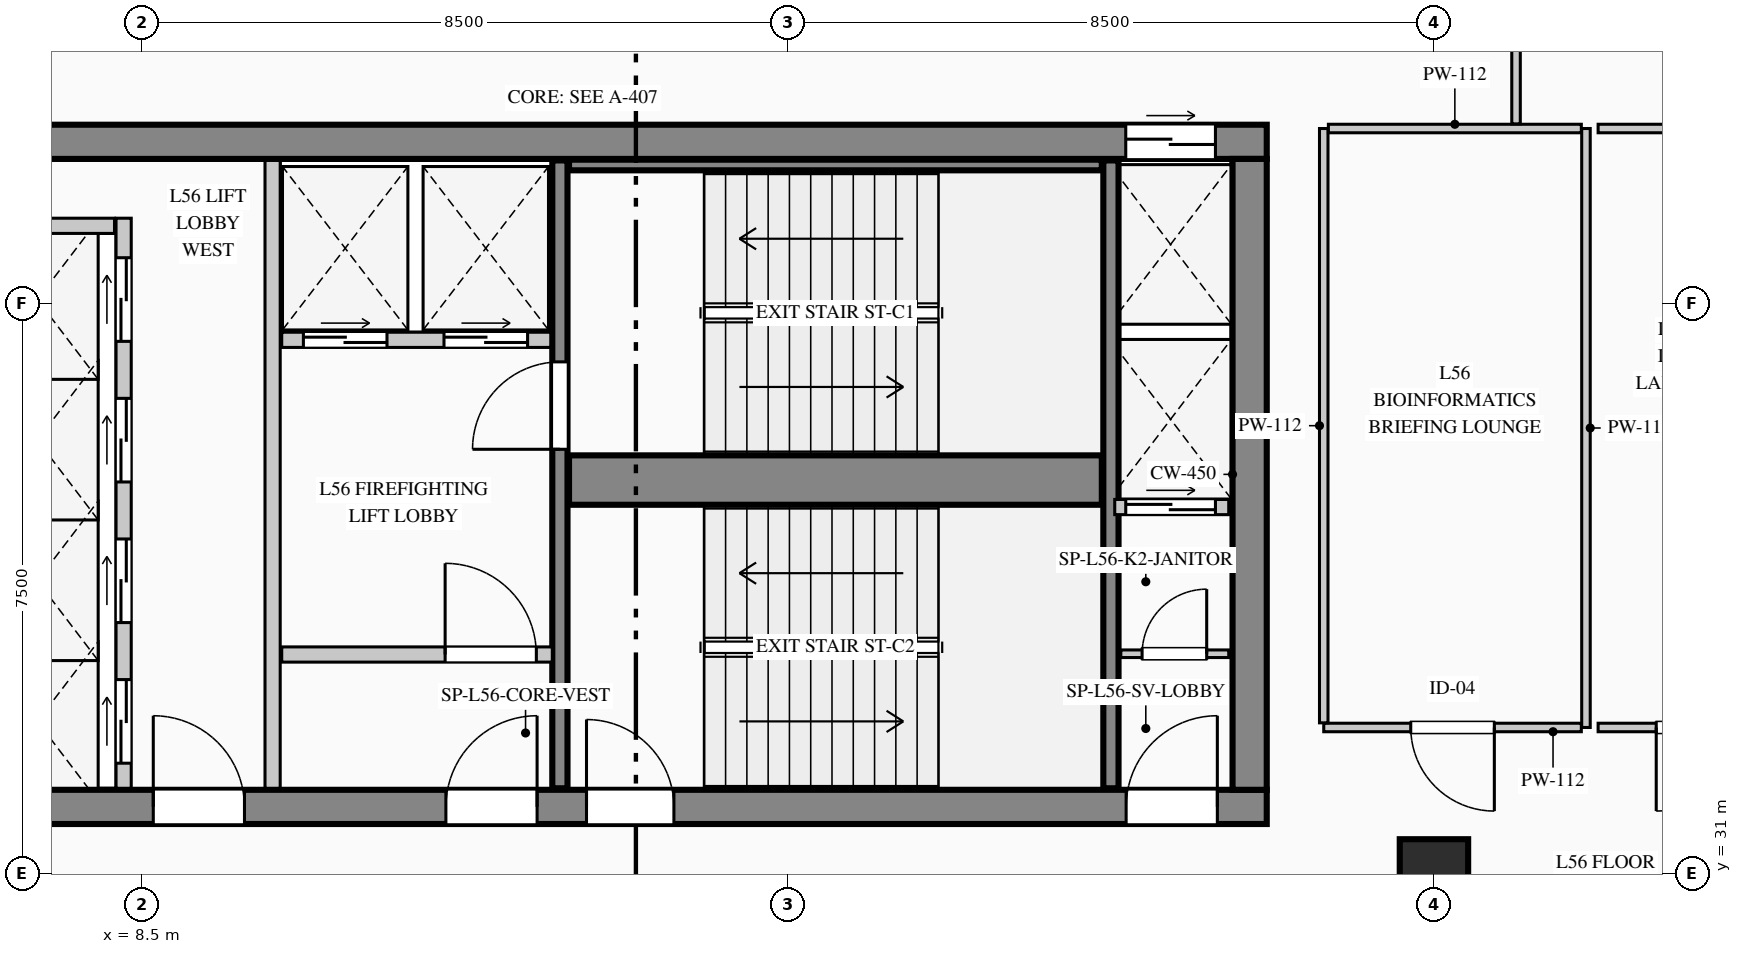
"""IFC4 building model, lengths in metres.
Left out: names, types, materials, properties, quantities, classifications, styles, units other than length and angle.
Written with IfcOpenShell. Run it as: python <this file> out.ifc"""

import sys

from ifc_helpers import new_model, si_unit, direction, frame, frame_2d, origin, origin_2d, place, context, subcontext, project, spatial, rectangle, extrude, element, fill, save


model = new_model("IFC4")
c1 = context("Model", 3, precision=1e-05, world=origin(), true_north=direction((0.0, 1.0)))
c2 = subcontext(c1, "Body", "Model", "MODEL_VIEW")
j1 = project(units=[si_unit("LENGTHUNIT", "METRE"), si_unit("PLANEANGLEUNIT", "RADIAN")], contexts=[c1])
p1 = place(None, origin())
s1 = spatial("IfcSite", under=j1, at=p1, CompositionType="ELEMENT")
p2 = place(p1, origin())
s2 = spatial("IfcBuilding", under=s1, at=p2, CompositionType="ELEMENT")
p3 = place(p2, frame((0.0, 0.0, 235.1)))
s3 = spatial("IfcBuildingStorey", under=s2, at=p3, CompositionType="ELEMENT", Elevation=235.1)
p4 = place(p3, frame((5.55, 40.625, 0.0), z_axis=(0.0, 0.0, 1.0), x_axis=(1.0, 0.0, 0.0)))
e1 = element("IfcWall", 1, at=p4, inside=s3, PredefinedType="SHEAR", context=c2, shape_type="SweptSolid", body=[
    extrude(rectangle(XDim=17.75, YDim=0.45, at=frame_2d((8.875, 0.0))), origin(), (0.0, 0.0, 1.0), 3.95),
])
p5 = place(p4, frame((15.895, 0.0, 0.0)))
e2 = element("IfcOpeningElement", 2, at=p5, cuts=e1, PredefinedType="OPENING", context=c2, shape_type="SweptSolid", body=[
    extrude(rectangle(XDim=1.18, YDim=2.25, at=frame_2d((0.59, 1.125))), frame((0.0, 0.235, 0.0), z_axis=(0.0, -1.0, 0.0), x_axis=(1.0, 0.0, 0.0)), (0.0, 0.0, 1.0), 0.47),
])
p6 = place(p3, frame((5.55, 31.875, 0.0), z_axis=(0.0, 0.0, 1.0), x_axis=(1.0, 0.0, 0.0)))
e3 = element("IfcWall", 3, at=p6, inside=s3, PredefinedType="SHEAR", context=c2, shape_type="SweptSolid", body=[
    extrude(rectangle(XDim=17.75, YDim=0.45, at=frame_2d((8.875, 0.0))), origin(), (0.0, 0.0, 1.0), 3.95),
])
p7 = place(p6, frame((3.1, 0.0, 0.0)))
e4 = element("IfcOpeningElement", 4, at=p7, cuts=e3, PredefinedType="OPENING", context=c2, shape_type="SweptSolid", body=[
    extrude(rectangle(XDim=1.2, YDim=2.2, at=frame_2d((0.6, 1.1))), frame((0.0, 0.235, 0.0), z_axis=(0.0, -1.0, 0.0), x_axis=(1.0, 0.0, 0.0)), (0.0, 0.0, 1.0), 0.47),
])
p8 = place(p6, frame((6.95, 0.0, 0.0)))
e5 = element("IfcOpeningElement", 5, at=p8, cuts=e3, PredefinedType="OPENING", context=c2, shape_type="SweptSolid", body=[
    extrude(rectangle(XDim=1.2, YDim=2.2, at=frame_2d((0.6, 1.1))), frame((0.0, 0.235, 0.0), z_axis=(0.0, -1.0, 0.0), x_axis=(1.0, 0.0, 0.0)), (0.0, 0.0, 1.0), 0.47),
])
p9 = place(p6, frame((8.8, 0.0, 0.0)))
e6 = element("IfcOpeningElement", 6, at=p9, cuts=e3, PredefinedType="OPENING", context=c2, shape_type="SweptSolid", body=[
    extrude(rectangle(XDim=1.15, YDim=2.2, at=frame_2d((0.575, 1.1))), frame((0.0, 0.235, 0.0), z_axis=(0.0, -1.0, 0.0), x_axis=(1.0, 0.0, 0.0)), (0.0, 0.0, 1.0), 0.47),
])
p10 = place(p6, frame((15.9, 0.0, 0.0)))
e7 = element("IfcOpeningElement", 7, at=p10, cuts=e3, PredefinedType="OPENING", context=c2, shape_type="SweptSolid", body=[
    extrude(rectangle(XDim=1.2, YDim=2.2, at=frame_2d((0.6, 1.1))), frame((0.0, 0.235, 0.0), z_axis=(0.0, -1.0, 0.0), x_axis=(1.0, 0.0, 0.0)), (0.0, 0.0, 1.0), 0.47),
])
p11 = place(p3, frame((23.075, 32.1, 0.0), z_axis=(0.0, 0.0, 1.0), x_axis=(0.0, 1.0, 0.0)))
e8 = element("IfcWall", 8, at=p11, inside=s3, PredefinedType="SHEAR", context=c2, shape_type="SweptSolid", body=[
    extrude(rectangle(XDim=8.3, YDim=0.45, at=frame_2d((4.15, 0.0))), origin(), (0.0, 0.0, 1.0), 3.95),
])
p12 = place(p3, frame((14.0, 32.12, 0.0), z_axis=(0.0, 0.0, 1.0), x_axis=(0.0, 1.0, 0.0)))
e9 = element("IfcWall", 9, at=p12, inside=s3, PredefinedType="SHEAR", context=c2, shape_type="SweptSolid", body=[
    extrude(rectangle(XDim=8.26, YDim=0.2, at=frame_2d((4.13, 0.0))), origin(), (0.0, 0.0, 1.0), 3.95),
])
p13 = place(p12, frame((4.46, 0.0, 0.0)))
e10 = element("IfcOpeningElement", 10, at=p13, cuts=e9, PredefinedType="OPENING", context=c2, shape_type="SweptSolid", body=[
    extrude(rectangle(XDim=1.15, YDim=2.2, at=frame_2d((0.575, 1.1))), frame((0.0, 0.11, 0.0), z_axis=(0.0, -1.0, 0.0), x_axis=(1.0, 0.0, 0.0)), (0.0, 0.0, 1.0), 0.22),
])
p14 = place(p3, frame((14.12, 36.175, 0.0), z_axis=(0.0, 0.0, 1.0), x_axis=(1.0, 0.0, 0.0)))
e11 = element("IfcWall", 11, at=p14, inside=s3, PredefinedType="SHEAR", context=c2, shape_type="SweptSolid", body=[
    extrude(rectangle(XDim=7.01, YDim=0.65, at=frame_2d((3.505, 0.0))), origin(), (0.0, 0.0, 1.0), 3.95),
])
p15 = place(p3, frame((21.25, 32.12, 0.0), z_axis=(0.0, 0.0, 1.0), x_axis=(0.0, 1.0, 0.0)))
e12 = element("IfcWall", 12, at=p15, inside=s3, PredefinedType="SHEAR", context=c2, shape_type="SweptSolid", body=[
    extrude(rectangle(XDim=8.26, YDim=0.2, at=frame_2d((4.13, 0.0))), origin(), (0.0, 0.0, 1.0), 3.95),
])
p16 = place(p3, frame((14.12, 40.32, 0.0), z_axis=(0.0, 0.0, 1.0), x_axis=(1.0, 0.0, 0.0)))
e13 = element("IfcWall", 13, at=p16, inside=s3, PredefinedType="SHEAR", context=c2, shape_type="SweptSolid", body=[
    extrude(rectangle(XDim=7.01, YDim=0.14, at=frame_2d((3.505, 0.0))), origin(), (0.0, 0.0, 1.0), 3.95),
])
p17 = place(p3, frame((25.5, 31.0, 0.0), z_axis=(0.0, 0.0, 1.0), x_axis=(1.0, 0.0, 0.0)))
e14 = element("IfcColumn", 14, at=p17, inside=s3, PredefinedType="COLUMN", context=c2, shape_type="SweptSolid", body=[
    extrude(rectangle(XDim=0.9, YDim=0.9, at=origin_2d()), origin(), (0.0, 0.0, 1.0), 3.95),
])
p18 = place(p3, frame((8.26, 32.12, 0.0), z_axis=(0.0, 0.0, 1.0), x_axis=(0.0, 1.0, 0.0)))
e15 = element("IfcWall", 15, at=p18, inside=s3, PredefinedType="PARTITIONING", context=c2, shape_type="SweptSolid", body=[
    extrude(rectangle(XDim=7.5, YDim=0.2, at=frame_2d((3.75, 0.0))), origin(), (0.0, 0.0, 1.0), 3.7),
])
p19 = place(p18, frame((0.33, 0.0, 0.0)))
e16 = element("IfcOpeningElement", 16, at=p19, cuts=e15, PredefinedType="OPENING", context=c2, shape_type="SweptSolid", body=[
    extrude(rectangle(XDim=1.1, YDim=2.2, at=frame_2d((0.55, 1.1))), frame((0.0, 0.11, 0.0), z_axis=(0.0, -1.0, 0.0), x_axis=(1.0, 0.0, 0.0)), (0.0, 0.0, 1.0), 0.22),
])
p20 = place(p18, frame((2.18, 0.0, 0.0)))
e17 = element("IfcOpeningElement", 17, at=p20, cuts=e15, PredefinedType="OPENING", context=c2, shape_type="SweptSolid", body=[
    extrude(rectangle(XDim=1.1, YDim=2.2, at=frame_2d((0.55, 1.1))), frame((0.0, 0.11, 0.0), z_axis=(0.0, -1.0, 0.0), x_axis=(1.0, 0.0, 0.0)), (0.0, 0.0, 1.0), 0.22),
])
p21 = place(p18, frame((4.03, 0.0, 0.0)))
e18 = element("IfcOpeningElement", 18, at=p21, cuts=e15, PredefinedType="OPENING", context=c2, shape_type="SweptSolid", body=[
    extrude(rectangle(XDim=1.1, YDim=2.2, at=frame_2d((0.55, 1.1))), frame((0.0, 0.11, 0.0), z_axis=(0.0, -1.0, 0.0), x_axis=(1.0, 0.0, 0.0)), (0.0, 0.0, 1.0), 0.22),
])
p22 = place(p18, frame((5.88, 0.0, 0.0)))
e19 = element("IfcOpeningElement", 19, at=p22, cuts=e15, PredefinedType="OPENING", context=c2, shape_type="SweptSolid", body=[
    extrude(rectangle(XDim=1.1, YDim=2.2, at=frame_2d((0.55, 1.1))), frame((0.0, 0.11, 0.0), z_axis=(0.0, -1.0, 0.0), x_axis=(1.0, 0.0, 0.0)), (0.0, 0.0, 1.0), 0.22),
])
p23 = place(p3, frame((6.02, 39.52, 0.0), z_axis=(0.0, 0.0, 1.0), x_axis=(1.0, 0.0, 0.0)))
e20 = element("IfcWall", 20, at=p23, inside=s3, PredefinedType="PARTITIONING", context=c2, shape_type="SweptSolid", body=[
    extrude(rectangle(XDim=2.12, YDim=0.2, at=frame_2d((1.06, 0.0))), origin(), (0.0, 0.0, 1.0), 3.7),
])
p24 = place(p3, frame((10.22, 32.12, 0.0), z_axis=(0.0, 0.0, 1.0), x_axis=(0.0, 1.0, 0.0)))
e21 = element("IfcWall", 21, at=p24, inside=s3, PredefinedType="PARTITIONING", context=c2, shape_type="SweptSolid", body=[
    extrude(rectangle(XDim=8.26, YDim=0.2, at=frame_2d((4.13, 0.0))), origin(), (0.0, 0.0, 1.0), 3.7),
])
p25 = place(p3, frame((10.34, 38.02, 0.0), z_axis=(0.0, 0.0, 1.0), x_axis=(1.0, 0.0, 0.0)))
e22 = element("IfcWall", 22, at=p25, inside=s3, PredefinedType="PARTITIONING", context=c2, shape_type="SweptSolid", body=[
    extrude(rectangle(XDim=3.54, YDim=0.2, at=frame_2d((1.77, 0.0))), origin(), (0.0, 0.0, 1.0), 3.7),
])
p26 = place(p25, frame((0.285, 0.0, 0.0)))
e23 = element("IfcOpeningElement", 23, at=p26, cuts=e22, PredefinedType="OPENING", context=c2, shape_type="SweptSolid", body=[
    extrude(rectangle(XDim=1.1, YDim=2.2, at=frame_2d((0.55, 1.1))), frame((0.0, 0.11, 0.0), z_axis=(0.0, -1.0, 0.0), x_axis=(1.0, 0.0, 0.0)), (0.0, 0.0, 1.0), 0.22),
])
p27 = place(p25, frame((2.135, 0.0, 0.0)))
e24 = element("IfcOpeningElement", 24, at=p27, cuts=e22, PredefinedType="OPENING", context=c2, shape_type="SweptSolid", body=[
    extrude(rectangle(XDim=1.1, YDim=2.2, at=frame_2d((0.55, 1.1))), frame((0.0, 0.11, 0.0), z_axis=(0.0, -1.0, 0.0), x_axis=(1.0, 0.0, 0.0)), (0.0, 0.0, 1.0), 0.22),
])
p28 = place(p3, frame((10.34, 33.88, 0.0), z_axis=(0.0, 0.0, 1.0), x_axis=(1.0, 0.0, 0.0)))
e25 = element("IfcWall", 25, at=p28, inside=s3, PredefinedType="PARTITIONING", context=c2, shape_type="SweptSolid", body=[
    extrude(rectangle(XDim=3.56, YDim=0.2, at=frame_2d((1.78, 0.0))), origin(), (0.0, 0.0, 1.0), 3.7),
])
p29 = place(p28, frame((2.15, 0.0, 0.0)))
e26 = element("IfcOpeningElement", 26, at=p29, cuts=e25, PredefinedType="OPENING", context=c2, shape_type="SweptSolid", body=[
    extrude(rectangle(XDim=1.2, YDim=2.2, at=frame_2d((0.6, 1.1))), frame((0.0, 0.11, 0.0), z_axis=(0.0, -1.0, 0.0), x_axis=(1.0, 0.0, 0.0)), (0.0, 0.0, 1.0), 0.22),
])
p30 = place(p3, frame((21.38, 33.89, 0.0), z_axis=(0.0, 0.0, 1.0), x_axis=(1.0, 0.0, 0.0)))
e27 = element("IfcWall", 27, at=p30, inside=s3, PredefinedType="PARTITIONING", context=c2, shape_type="SweptSolid", body=[
    extrude(rectangle(XDim=1.42, YDim=0.1, at=frame_2d((0.71, 0.0))), origin(), (0.0, 0.0, 1.0), 3.7),
])
p31 = place(p30, frame((0.28, 0.0, 0.0)))
e28 = element("IfcOpeningElement", 28, at=p31, cuts=e27, PredefinedType="OPENING", context=c2, shape_type="SweptSolid", body=[
    extrude(rectangle(XDim=0.85, YDim=2.1, at=frame_2d((0.425, 1.05))), frame((0.0, 0.06, 0.0), z_axis=(0.0, -1.0, 0.0), x_axis=(1.0, 0.0, 0.0)), (0.0, 0.0, 1.0), 0.12),
])
p32 = place(p3, frame((21.3, 35.82, 0.0), z_axis=(0.0, 0.0, 1.0), x_axis=(1.0, 0.0, 0.0)))
e29 = element("IfcWall", 29, at=p32, inside=s3, PredefinedType="PARTITIONING", context=c2, shape_type="SweptSolid", body=[
    extrude(rectangle(XDim=1.5, YDim=0.2, at=frame_2d((0.75, 0.0))), origin(), (0.0, 0.0, 1.0), 3.7),
])
p33 = place(p32, frame((0.145, 0.0, 0.0)))
e30 = element("IfcOpeningElement", 30, at=p33, cuts=e29, PredefinedType="OPENING", context=c2, shape_type="SweptSolid", body=[
    extrude(rectangle(XDim=1.18, YDim=2.25, at=frame_2d((0.59, 1.125))), frame((0.0, 0.11, 0.0), z_axis=(0.0, -1.0, 0.0), x_axis=(1.0, 0.0, 0.0)), (0.0, 0.0, 1.0), 0.22),
])
p34 = place(p3, frame((27.5, 40.8, 0.0), z_axis=(0.0, 0.0, 1.0), x_axis=(0.0, -1.0, 0.0)))
e31 = element("IfcWall", 31, at=p34, inside=s3, PredefinedType="PARTITIONING", context=c2, shape_type="SweptSolid", body=[
    extrude(rectangle(XDim=7.88, YDim=0.112, at=frame_2d((3.94, 0.0))), origin(), (0.0, 0.0, 1.0), 3.7),
])
p35 = place(p3, frame((27.439, 32.92, 0.0), z_axis=(0.0, 0.0, 1.0), x_axis=(-1.0, 0.0, 0.0)))
e32 = element("IfcWall", 32, at=p35, inside=s3, PredefinedType="PARTITIONING", context=c2, shape_type="SweptSolid", body=[
    extrude(rectangle(XDim=3.389, YDim=0.112, at=frame_2d((1.694, 0.0))), origin(), (0.0, 0.0, 1.0), 3.7),
])
p36 = place(p35, frame((1.145, 0.0, 0.0)))
e33 = element("IfcOpeningElement", 33, at=p36, cuts=e32, PredefinedType="OPENING", context=c2, shape_type="SweptSolid", body=[
    extrude(rectangle(XDim=1.1, YDim=2.2, at=frame_2d((0.55, 1.1))), frame((0.0, 0.066, 0.0), z_axis=(0.0, -1.0, 0.0), x_axis=(1.0, 0.0, 0.0)), (0.0, 0.0, 1.0), 0.132),
])
p37 = place(p3, frame((24.05, 32.981, 0.0), z_axis=(0.0, 0.0, 1.0), x_axis=(0.0, 1.0, 0.0)))
e34 = element("IfcWall", 34, at=p37, inside=s3, PredefinedType="PARTITIONING", context=c2, shape_type="SweptSolid", body=[
    extrude(rectangle(XDim=7.819, YDim=0.112, at=frame_2d((3.91, 0.0))), origin(), (0.0, 0.0, 1.0), 3.7),
])
p38 = place(p3, frame((24.111, 40.8, 0.0), z_axis=(0.0, 0.0, 1.0), x_axis=(1.0, 0.0, 0.0)))
e35 = element("IfcWall", 35, at=p38, inside=s3, PredefinedType="PARTITIONING", context=c2, shape_type="SweptSolid", body=[
    extrude(rectangle(XDim=3.328, YDim=0.112, at=frame_2d((1.664, 0.0))), origin(), (0.0, 0.0, 1.0), 3.7),
])
p39 = place(p3, frame((30.289, 32.92, 0.0), z_axis=(0.0, 0.0, 1.0), x_axis=(-1.0, 0.0, 0.0)))
e36 = element("IfcWall", 36, at=p39, inside=s3, PredefinedType="PARTITIONING", context=c2, shape_type="SweptSolid", body=[
    extrude(rectangle(XDim=2.629, YDim=0.112, at=frame_2d((1.314, 0.0))), origin(), (0.0, 0.0, 1.0), 3.7),
])
p40 = place(p39, frame((0.764, 0.0, 0.0)))
e37 = element("IfcOpeningElement", 37, at=p40, cuts=e36, PredefinedType="OPENING", context=c2, shape_type="SweptSolid", body=[
    extrude(rectangle(XDim=1.1, YDim=2.2, at=frame_2d((0.55, 1.1))), frame((0.0, 0.066, 0.0), z_axis=(0.0, -1.0, 0.0), x_axis=(1.0, 0.0, 0.0)), (0.0, 0.0, 1.0), 0.132),
])
p41 = place(p3, frame((27.66, 40.8, 0.0), z_axis=(0.0, 0.0, 1.0), x_axis=(1.0, 0.0, 0.0)))
e38 = element("IfcWall", 38, at=p41, inside=s3, PredefinedType="PARTITIONING", context=c2, shape_type="SweptSolid", body=[
    extrude(rectangle(XDim=2.629, YDim=0.112, at=frame_2d((1.314, 0.0))), origin(), (0.0, 0.0, 1.0), 3.7),
])
p42 = place(p3, frame((26.58, 40.861, 0.0), z_axis=(0.0, 0.0, 1.0), x_axis=(0.0, 1.0, 0.0)))
e39 = element("IfcWall", 39, at=p42, inside=s3, PredefinedType="PARTITIONING", context=c2, shape_type="SweptSolid", body=[
    extrude(rectangle(XDim=2.318, YDim=0.112, at=frame_2d((1.159, 0.0))), origin(), (0.0, 0.0, 1.0), 3.7),
])
p43 = place(p7, origin())
e40 = element("IfcDoor", 40, at=p43, inside=s3, OperationType="SINGLE_SWING_LEFT", PredefinedType="DOOR", context=c2, shape_type="SweptSolid", body=[
    extrude(rectangle(XDim=1.2, YDim=2.2, at=frame_2d((0.6, 1.1))), frame((0.0, 0.025, 0.0), z_axis=(0.0, -1.0, 0.0), x_axis=(1.0, 0.0, 0.0)), (0.0, 0.0, 1.0), 0.05),
])
fill(e4, e40)
p44 = place(p8, origin())
e41 = element("IfcDoor", 41, at=p44, inside=s3, OperationType="SINGLE_SWING_RIGHT", PredefinedType="DOOR", context=c2, shape_type="SweptSolid", body=[
    extrude(rectangle(XDim=1.2, YDim=2.2, at=frame_2d((0.6, 1.1))), frame((0.0, 0.025, 0.0), z_axis=(0.0, -1.0, 0.0), x_axis=(1.0, 0.0, 0.0)), (0.0, 0.0, 1.0), 0.05),
])
fill(e5, e41)
p45 = place(p9, origin())
e42 = element("IfcDoor", 42, at=p45, inside=s3, OperationType="SINGLE_SWING_LEFT", PredefinedType="DOOR", context=c2, shape_type="SweptSolid", body=[
    extrude(rectangle(XDim=1.15, YDim=2.2, at=frame_2d((0.575, 1.1))), frame((0.0, 0.025, 0.0), z_axis=(0.0, -1.0, 0.0), x_axis=(1.0, 0.0, 0.0)), (0.0, 0.0, 1.0), 0.05),
])
fill(e6, e42)
p46 = place(p10, origin())
e43 = element("IfcDoor", 43, at=p46, inside=s3, OperationType="SINGLE_SWING_RIGHT", PredefinedType="DOOR", context=c2, shape_type="SweptSolid", body=[
    extrude(rectangle(XDim=1.2, YDim=2.2, at=frame_2d((0.6, 1.1))), frame((0.0, 0.025, 0.0), z_axis=(0.0, -1.0, 0.0), x_axis=(1.0, 0.0, 0.0)), (0.0, 0.0, 1.0), 0.05),
])
fill(e7, e43)
p47 = place(p29, origin())
e44 = element("IfcDoor", 44, at=p47, inside=s3, OperationType="SINGLE_SWING_LEFT", PredefinedType="DOOR", context=c2, shape_type="SweptSolid", body=[
    extrude(rectangle(XDim=1.2, YDim=2.2, at=frame_2d((0.6, 1.1))), frame((0.0, 0.025, 0.0), z_axis=(0.0, -1.0, 0.0), x_axis=(1.0, 0.0, 0.0)), (0.0, 0.0, 1.0), 0.05),
])
fill(e26, e44)
p48 = place(p31, origin())
e45 = element("IfcDoor", 45, at=p48, inside=s3, OperationType="SINGLE_SWING_RIGHT", PredefinedType="DOOR", context=c2, shape_type="SweptSolid", body=[
    extrude(rectangle(XDim=0.85, YDim=2.1, at=frame_2d((0.425, 1.05))), frame((0.0, 0.025, 0.0), z_axis=(0.0, -1.0, 0.0), x_axis=(1.0, 0.0, 0.0)), (0.0, 0.0, 1.0), 0.05),
])
fill(e28, e45)
p49 = place(p13, origin())
e46 = element("IfcDoor", 46, at=p49, inside=s3, OperationType="SINGLE_SWING_LEFT", PredefinedType="DOOR", context=c2, shape_type="SweptSolid", body=[
    extrude(rectangle(XDim=1.15, YDim=2.2, at=frame_2d((0.575, 1.1))), frame((0.0, 0.025, 0.0), z_axis=(0.0, -1.0, 0.0), x_axis=(1.0, 0.0, 0.0)), (0.0, 0.0, 1.0), 0.05),
])
fill(e10, e46)
p50 = place(p19, origin())
e47 = element("IfcDoor", 47, at=p50, inside=s3, OperationType="DOUBLE_DOOR_SLIDING", PredefinedType="DOOR", context=c2, shape_type="SweptSolid", body=[
    extrude(rectangle(XDim=1.1, YDim=2.2, at=frame_2d((0.55, 1.1))), frame((0.0, 0.025, 0.0), z_axis=(0.0, -1.0, 0.0), x_axis=(1.0, 0.0, 0.0)), (0.0, 0.0, 1.0), 0.05),
])
fill(e16, e47)
p51 = place(p20, origin())
e48 = element("IfcDoor", 48, at=p51, inside=s3, OperationType="DOUBLE_DOOR_SLIDING", PredefinedType="DOOR", context=c2, shape_type="SweptSolid", body=[
    extrude(rectangle(XDim=1.1, YDim=2.2, at=frame_2d((0.55, 1.1))), frame((0.0, 0.025, 0.0), z_axis=(0.0, -1.0, 0.0), x_axis=(1.0, 0.0, 0.0)), (0.0, 0.0, 1.0), 0.05),
])
fill(e17, e48)
p52 = place(p21, origin())
e49 = element("IfcDoor", 49, at=p52, inside=s3, OperationType="DOUBLE_DOOR_SLIDING", PredefinedType="DOOR", context=c2, shape_type="SweptSolid", body=[
    extrude(rectangle(XDim=1.1, YDim=2.2, at=frame_2d((0.55, 1.1))), frame((0.0, 0.025, 0.0), z_axis=(0.0, -1.0, 0.0), x_axis=(1.0, 0.0, 0.0)), (0.0, 0.0, 1.0), 0.05),
])
fill(e18, e49)
p53 = place(p22, origin())
e50 = element("IfcDoor", 50, at=p53, inside=s3, OperationType="DOUBLE_DOOR_SLIDING", PredefinedType="DOOR", context=c2, shape_type="SweptSolid", body=[
    extrude(rectangle(XDim=1.1, YDim=2.2, at=frame_2d((0.55, 1.1))), frame((0.0, 0.025, 0.0), z_axis=(0.0, -1.0, 0.0), x_axis=(1.0, 0.0, 0.0)), (0.0, 0.0, 1.0), 0.05),
])
fill(e19, e50)
p54 = place(p26, origin())
e51 = element("IfcDoor", 51, at=p54, inside=s3, OperationType="DOUBLE_DOOR_SLIDING", PredefinedType="DOOR", context=c2, shape_type="SweptSolid", body=[
    extrude(rectangle(XDim=1.1, YDim=2.2, at=frame_2d((0.55, 1.1))), frame((0.0, 0.025, 0.0), z_axis=(0.0, -1.0, 0.0), x_axis=(1.0, 0.0, 0.0)), (0.0, 0.0, 1.0), 0.05),
])
fill(e23, e51)
p55 = place(p27, origin())
e52 = element("IfcDoor", 52, at=p55, inside=s3, OperationType="DOUBLE_DOOR_SLIDING", PredefinedType="DOOR", context=c2, shape_type="SweptSolid", body=[
    extrude(rectangle(XDim=1.1, YDim=2.2, at=frame_2d((0.55, 1.1))), frame((0.0, 0.025, 0.0), z_axis=(0.0, -1.0, 0.0), x_axis=(1.0, 0.0, 0.0)), (0.0, 0.0, 1.0), 0.05),
])
fill(e24, e52)
p56 = place(p5, origin())
e53 = element("IfcDoor", 53, at=p56, inside=s3, OperationType="DOUBLE_DOOR_SLIDING", PredefinedType="DOOR", context=c2, shape_type="SweptSolid", body=[
    extrude(rectangle(XDim=1.18, YDim=2.25, at=frame_2d((0.59, 1.125))), frame((0.0, 0.025, 0.0), z_axis=(0.0, -1.0, 0.0), x_axis=(1.0, 0.0, 0.0)), (0.0, 0.0, 1.0), 0.05),
])
fill(e2, e53)
p57 = place(p33, origin())
e54 = element("IfcDoor", 54, at=p57, inside=s3, OperationType="DOUBLE_DOOR_SLIDING", PredefinedType="DOOR", context=c2, shape_type="SweptSolid", body=[
    extrude(rectangle(XDim=1.18, YDim=2.25, at=frame_2d((0.59, 1.125))), frame((0.0, 0.025, 0.0), z_axis=(0.0, -1.0, 0.0), x_axis=(1.0, 0.0, 0.0)), (0.0, 0.0, 1.0), 0.05),
])
fill(e30, e54)
p58 = place(p36, origin())
e55 = element("IfcDoor", 55, at=p58, inside=s3, OperationType="SINGLE_SWING_LEFT", PredefinedType="DOOR", context=c2, shape_type="SweptSolid", body=[
    extrude(rectangle(XDim=1.1, YDim=2.2, at=frame_2d((0.55, 1.1))), frame((0.0, 0.025, 0.0), z_axis=(0.0, -1.0, 0.0), x_axis=(1.0, 0.0, 0.0)), (0.0, 0.0, 1.0), 0.05),
])
fill(e33, e55)
p59 = place(p40, origin())
e56 = element("IfcDoor", 56, at=p59, inside=s3, OperationType="SINGLE_SWING_RIGHT", PredefinedType="DOOR", context=c2, shape_type="SweptSolid", body=[
    extrude(rectangle(XDim=1.1, YDim=2.2, at=frame_2d((0.55, 1.1))), frame((0.0, 0.025, 0.0), z_axis=(0.0, -1.0, 0.0), x_axis=(1.0, 0.0, 0.0)), (0.0, 0.0, 1.0), 0.05),
])
fill(e37, e56)
save(model, sys.argv[1])
